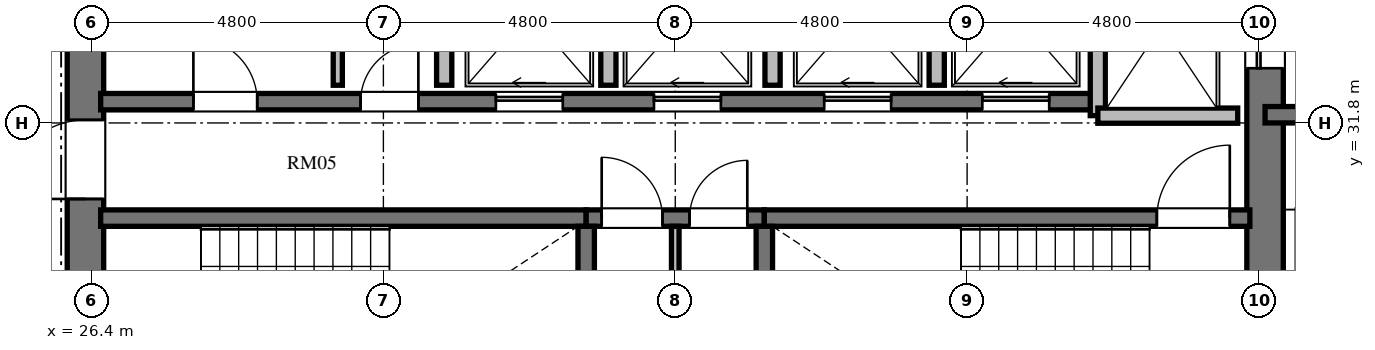
"""IFC4 building model, lengths in metres.
Left out: names, types, materials, properties, quantities, classifications, styles, units other than length and angle.
Written with IfcOpenShell. Run it as: python <this file> out.ifc"""

import sys

from ifc_helpers import new_model, si_unit, direction, frame, frame_2d, origin, place, context, subcontext, project, spatial, rectangle, extrude, element, fill, save


model = new_model("IFC4")
c1 = context("Model", 3, precision=1e-05, world=origin(), true_north=direction((0.0, 1.0)))
c2 = subcontext(c1, "Body", "Model", "MODEL_VIEW")
j1 = project(units=[si_unit("LENGTHUNIT", "METRE"), si_unit("PLANEANGLEUNIT", "RADIAN")], contexts=[c1])
p1 = place(None, origin())
s1 = spatial("IfcSite", under=j1, at=p1, CompositionType="ELEMENT")
p2 = place(p1, origin())
s2 = spatial("IfcBuilding", under=s1, at=p2, CompositionType="ELEMENT")
p3 = place(p2, frame((0.0, 0.0, 138.288)))
s3 = spatial("IfcBuildingStorey", under=s2, at=p3, CompositionType="ELEMENT", Elevation=138.288)
p4 = place(p3, frame((26.3, 20.95, 0.0), z_axis=(0.0, 0.0, 1.0), x_axis=(0.0, 1.0, 0.0)))
e1 = element("IfcWall", 1, at=p4, inside=s3, PredefinedType="SHEAR", context=c2, shape_type="SweptSolid", body=[
    extrude(rectangle(XDim=14.1, YDim=0.6, at=frame_2d((7.05, 0.0))), origin(), (0.0, 0.0, 1.0), 3.648),
])
p5 = place(p4, frame((6.5, 0.0, 0.0)))
e2 = element("IfcOpeningElement", 2, at=p5, cuts=e1, PredefinedType="OPENING", context=c2, shape_type="SweptSolid", body=[
    extrude(rectangle(XDim=1.2, YDim=2.15, at=frame_2d((0.6, 1.075))), frame((0.0, 0.31, 0.0), z_axis=(0.0, -1.0, 0.0), x_axis=(1.0, 0.0, 0.0)), (0.0, 0.0, 1.0), 0.62),
])
p6 = place(p4, frame((9.6, 0.0, 0.0)))
e3 = element("IfcOpeningElement", 3, at=p6, cuts=e1, PredefinedType="OPENING", context=c2, shape_type="SweptSolid", body=[
    extrude(rectangle(XDim=1.3, YDim=2.2, at=frame_2d((0.65, 1.1))), frame((0.0, 0.31, 0.0), z_axis=(0.0, -1.0, 0.0), x_axis=(1.0, 0.0, 0.0)), (0.0, 0.0, 1.0), 0.62),
])
p7 = place(p4, frame((3.26, 0.0, 0.0)))
e4 = element("IfcOpeningElement", 4, at=p7, cuts=e1, PredefinedType="OPENING", context=c2, shape_type="SweptSolid", body=[
    extrude(rectangle(XDim=1.3, YDim=2.2, at=frame_2d((0.65, 1.1))), frame((0.0, 0.31, 0.0), z_axis=(0.0, -1.0, 0.0), x_axis=(1.0, 0.0, 0.0)), (0.0, 0.0, 1.0), 0.62),
])
p8 = place(p3, frame((45.7, 20.95, 0.0), z_axis=(0.0, 0.0, 1.0), x_axis=(0.0, 1.0, 0.0)))
e5 = element("IfcWall", 5, at=p8, inside=s3, PredefinedType="SHEAR", context=c2, shape_type="SweptSolid", body=[
    extrude(rectangle(XDim=14.1, YDim=0.6, at=frame_2d((7.05, 0.0))), origin(), (0.0, 0.0, 1.0), 3.648),
])
p9 = place(p8, frame((11.75, 0.0, 0.0)))
e6 = element("IfcOpeningElement", 6, at=p9, cuts=e5, PredefinedType="OPENING", context=c2, shape_type="SweptSolid", body=[
    extrude(rectangle(XDim=1.4, YDim=2.3, at=frame_2d((0.7, 1.15))), frame((0.0, 0.31, 0.0), z_axis=(0.0, -1.0, 0.0), x_axis=(1.0, 0.0, 0.0)), (0.0, 0.0, 1.0), 0.62),
])
p10 = place(p8, frame((0.95, 0.0, 0.0)))
e7 = element("IfcOpeningElement", 7, at=p10, cuts=e5, PredefinedType="OPENING", context=c2, shape_type="SweptSolid", body=[
    extrude(rectangle(XDim=1.4, YDim=2.3, at=frame_2d((0.7, 1.15))), frame((0.0, 0.31, 0.0), z_axis=(0.0, -1.0, 0.0), x_axis=(1.0, 0.0, 0.0)), (0.0, 0.0, 1.0), 0.62),
])
p11 = place(p3, frame((26.55, 30.235, 0.0), z_axis=(0.0, 0.0, 1.0), x_axis=(1.0, 0.0, 0.0)))
e8 = element("IfcWall", 8, at=p11, inside=s3, PredefinedType="SHEAR", context=c2, shape_type="SweptSolid", body=[
    extrude(rectangle(XDim=7.985, YDim=0.27, at=frame_2d((3.992, 0.0))), origin(), (0.0, 0.0, 1.0), 3.648),
])
p12 = place(p3, frame((34.535, 30.235, 0.0), z_axis=(0.0, 0.0, 1.0), x_axis=(1.0, 0.0, 0.0)))
e9 = element("IfcWall", 9, at=p12, inside=s3, PredefinedType="SHEAR", context=c2, shape_type="SweptSolid", body=[
    extrude(rectangle(XDim=2.93, YDim=0.27, at=frame_2d((1.465, 0.0))), origin(), (0.0, 0.0, 1.0), 3.648),
])
p13 = place(p12, frame((0.255, 0.0, 0.0)))
e10 = element("IfcOpeningElement", 10, at=p13, cuts=e9, PredefinedType="OPENING", context=c2, shape_type="SweptSolid", body=[
    extrude(rectangle(XDim=1.0, YDim=2.1, at=frame_2d((0.5, 1.05))), frame((0.0, 0.145, 0.0), z_axis=(0.0, -1.0, 0.0), x_axis=(1.0, 0.0, 0.0)), (0.0, 0.0, 1.0), 0.29),
])
p14 = place(p12, frame((1.7, 0.0, 0.0)))
e11 = element("IfcOpeningElement", 11, at=p14, cuts=e9, PredefinedType="OPENING", context=c2, shape_type="SweptSolid", body=[
    extrude(rectangle(XDim=0.95, YDim=2.1, at=frame_2d((0.475, 1.05))), frame((0.0, 0.145, 0.0), z_axis=(0.0, -1.0, 0.0), x_axis=(1.0, 0.0, 0.0)), (0.0, 0.0, 1.0), 0.29),
])
p15 = place(p3, frame((37.465, 30.235, 0.0), z_axis=(0.0, 0.0, 1.0), x_axis=(1.0, 0.0, 0.0)))
e12 = element("IfcWall", 12, at=p15, inside=s3, PredefinedType="SHEAR", context=c2, shape_type="SweptSolid", body=[
    extrude(rectangle(XDim=7.985, YDim=0.27, at=frame_2d((3.992, 0.0))), origin(), (0.0, 0.0, 1.0), 3.648),
])
p16 = place(p15, frame((6.455, 0.0, 0.0)))
e13 = element("IfcOpeningElement", 13, at=p16, cuts=e12, PredefinedType="OPENING", context=c2, shape_type="SweptSolid", body=[
    extrude(rectangle(XDim=1.2, YDim=2.15, at=frame_2d((0.6, 1.075))), frame((0.0, 0.145, 0.0), z_axis=(0.0, -1.0, 0.0), x_axis=(1.0, 0.0, 0.0)), (0.0, 0.0, 1.0), 0.29),
])
for number, where, z_axis, x_axis in (
    (14, (34.535, 26.02, 0.0), (0.0, 0.0, 1.0), (0.0, 1.0, 0.0)),
    (15, (37.465, 26.02, 0.0), (0.0, 0.0, 1.0), (0.0, 1.0, 0.0)),
):
    element("IfcWall", number, at=place(p3, frame(where, z_axis=z_axis, x_axis=x_axis)), inside=s3, PredefinedType="SHEAR", context=c2, shape_type="SweptSolid", body=[
        extrude(rectangle(XDim=4.08, YDim=0.27, at=frame_2d((2.04, 0.0))), origin(), (0.0, 0.0, 1.0), 3.648),
    ])
p17 = place(p3, frame((36.0, 26.02, 0.0), z_axis=(0.0, 0.0, 1.0), x_axis=(0.0, 1.0, 0.0)))
e16 = element("IfcWall", 16, at=p17, inside=s3, PredefinedType="PARTITIONING", context=c2, shape_type="SweptSolid", body=[
    extrude(rectangle(XDim=4.08, YDim=0.125, at=frame_2d((2.04, 0.0))), origin(), (0.0, 0.0, 1.0), 3.428),
])
p18 = place(p3, frame((26.55, 32.15, 0.0), z_axis=(0.0, 0.0, 1.0), x_axis=(1.0, 0.0, 0.0)))
e17 = element("IfcWall", 17, at=p18, inside=s3, PredefinedType="SHEAR", context=c2, shape_type="SweptSolid", body=[
    extrude(rectangle(XDim=16.4, YDim=0.27, at=frame_2d((8.2, 0.0))), origin(), (0.0, 0.0, 1.0), 3.648),
])
p19 = place(p18, frame((1.525, 0.0, 0.0)))
e18 = element("IfcOpeningElement", 18, at=p19, cuts=e17, PredefinedType="OPENING", context=c2, shape_type="SweptSolid", body=[
    extrude(rectangle(XDim=1.05, YDim=2.15, at=frame_2d((0.525, 1.075))), frame((0.0, 0.145, 0.0), z_axis=(0.0, -1.0, 0.0), x_axis=(1.0, 0.0, 0.0)), (0.0, 0.0, 1.0), 0.29),
])
p20 = place(p18, frame((4.275, 0.0, 0.0)))
e19 = element("IfcOpeningElement", 19, at=p20, cuts=e17, PredefinedType="OPENING", context=c2, shape_type="SweptSolid", body=[
    extrude(rectangle(XDim=0.95, YDim=2.1, at=frame_2d((0.475, 1.05))), frame((0.0, 0.145, 0.0), z_axis=(0.0, -1.0, 0.0), x_axis=(1.0, 0.0, 0.0)), (0.0, 0.0, 1.0), 0.29),
])
p21 = place(p18, frame((6.5, 0.0, 0.0)))
e20 = element("IfcOpeningElement", 20, at=p21, cuts=e17, PredefinedType="OPENING", context=c2, shape_type="SweptSolid", body=[
    extrude(rectangle(XDim=1.1, YDim=2.2, at=frame_2d((0.55, 1.1))), frame((0.0, 0.145, 0.0), z_axis=(0.0, -1.0, 0.0), x_axis=(1.0, 0.0, 0.0)), (0.0, 0.0, 1.0), 0.29),
])
p22 = place(p18, frame((9.1, 0.0, 0.0)))
e21 = element("IfcOpeningElement", 21, at=p22, cuts=e17, PredefinedType="OPENING", context=c2, shape_type="SweptSolid", body=[
    extrude(rectangle(XDim=1.1, YDim=2.2, at=frame_2d((0.55, 1.1))), frame((0.0, 0.145, 0.0), z_axis=(0.0, -1.0, 0.0), x_axis=(1.0, 0.0, 0.0)), (0.0, 0.0, 1.0), 0.29),
])
p23 = place(p18, frame((11.9, 0.0, 0.0)))
e22 = element("IfcOpeningElement", 22, at=p23, cuts=e17, PredefinedType="OPENING", context=c2, shape_type="SweptSolid", body=[
    extrude(rectangle(XDim=1.1, YDim=2.2, at=frame_2d((0.55, 1.1))), frame((0.0, 0.145, 0.0), z_axis=(0.0, -1.0, 0.0), x_axis=(1.0, 0.0, 0.0)), (0.0, 0.0, 1.0), 0.29),
])
p24 = place(p18, frame((14.5, 0.0, 0.0)))
e23 = element("IfcOpeningElement", 23, at=p24, cuts=e17, PredefinedType="OPENING", context=c2, shape_type="SweptSolid", body=[
    extrude(rectangle(XDim=1.1, YDim=2.2, at=frame_2d((0.55, 1.1))), frame((0.0, 0.145, 0.0), z_axis=(0.0, -1.0, 0.0), x_axis=(1.0, 0.0, 0.0)), (0.0, 0.0, 1.0), 0.29),
])
p25 = place(p3, frame((42.95, 31.92, 0.0), z_axis=(0.0, 0.0, 1.0), x_axis=(0.0, 1.0, 0.0)))
e24 = element("IfcWall", 24, at=p25, inside=s3, PredefinedType="SOLIDWALL", context=c2, shape_type="SweptSolid", body=[
    extrude(rectangle(XDim=3.18, YDim=0.25, at=frame_2d((1.59, 0.0))), origin(), (0.0, 0.0, 1.0), 3.428),
])
p26 = place(p3, frame((42.95, 31.92, 0.0), z_axis=(0.0, 0.0, 1.0), x_axis=(1.0, 0.0, 0.0)))
e25 = element("IfcWall", 25, at=p26, inside=s3, PredefinedType="SOLIDWALL", context=c2, shape_type="SweptSolid", body=[
    extrude(rectangle(XDim=2.3, YDim=0.25, at=frame_2d((1.15, 0.0))), origin(), (0.0, 0.0, 1.0), 3.428),
])
for number, where, z_axis, x_axis in (
    (26, (32.2, 32.42, 0.0), (0.0, 0.0, 1.0), (0.0, 1.0, 0.0)),
    (27, (34.9, 32.42, 0.0), (0.0, 0.0, 1.0), (0.0, 1.0, 0.0)),
    (28, (37.6, 32.42, 0.0), (0.0, 0.0, 1.0), (0.0, 1.0, 0.0)),
    (29, (40.3, 32.42, 0.0), (0.0, 0.0, 1.0), (0.0, 1.0, 0.0)),
):
    element("IfcWall", number, at=place(p3, frame(where, z_axis=z_axis, x_axis=x_axis)), inside=s3, PredefinedType="SOLIDWALL", context=c2, shape_type="SweptSolid", body=[
        extrude(rectangle(XDim=2.68, YDim=0.25, at=frame_2d((1.34, 0.0))), origin(), (0.0, 0.0, 1.0), 3.428),
    ])
p27 = place(p3, frame((30.45, 32.42, 0.0), z_axis=(0.0, 0.0, 1.0), x_axis=(0.0, 1.0, 0.0)))
e30 = element("IfcWall", 30, at=p27, inside=s3, PredefinedType="PARTITIONING", context=c2, shape_type="SweptSolid", body=[
    extrude(rectangle(XDim=2.68, YDim=0.15, at=frame_2d((1.34, 0.0))), origin(), (0.0, 0.0, 1.0), 3.428),
])
p28 = place(p3, frame((45.7, 31.935, 0.0), z_axis=(0.0, 0.0, 1.0), x_axis=(1.0, 0.0, 0.0)))
e31 = element("IfcWall", 31, at=p28, inside=s3, PredefinedType="SHEAR", context=c2, shape_type="SweptSolid", body=[
    extrude(rectangle(XDim=4.715, YDim=0.27, at=frame_2d((2.357, 0.0))), origin(), (0.0, 0.0, 1.0), 3.648),
])
p29 = place(p16, origin())
e32 = element("IfcDoor", 32, at=p29, inside=s3, OperationType="SINGLE_SWING_RIGHT", PredefinedType="DOOR", context=c2, shape_type="SweptSolid", body=[
    extrude(rectangle(XDim=1.2, YDim=2.15, at=frame_2d((0.6, 1.075))), frame((0.0, 0.025, 0.0), z_axis=(0.0, -1.0, 0.0), x_axis=(1.0, 0.0, 0.0)), (0.0, 0.0, 1.0), 0.05),
])
fill(e13, e32)
p30 = place(p13, origin())
e33 = element("IfcDoor", 33, at=p30, inside=s3, OperationType="SINGLE_SWING_LEFT", PredefinedType="DOOR", context=c2, shape_type="SweptSolid", body=[
    extrude(rectangle(XDim=1.0, YDim=2.1, at=frame_2d((0.5, 1.05))), frame((0.0, 0.025, 0.0), z_axis=(0.0, -1.0, 0.0), x_axis=(1.0, 0.0, 0.0)), (0.0, 0.0, 1.0), 0.05),
])
fill(e10, e33)
p31 = place(p14, origin())
e34 = element("IfcDoor", 34, at=p31, inside=s3, OperationType="SINGLE_SWING_RIGHT", PredefinedType="DOOR", context=c2, shape_type="SweptSolid", body=[
    extrude(rectangle(XDim=0.95, YDim=2.1, at=frame_2d((0.475, 1.05))), frame((0.0, 0.025, 0.0), z_axis=(0.0, -1.0, 0.0), x_axis=(1.0, 0.0, 0.0)), (0.0, 0.0, 1.0), 0.05),
])
fill(e11, e34)
p32 = place(p6, origin())
e35 = element("IfcDoor", 35, at=p32, inside=s3, OperationType="SINGLE_SWING_LEFT", PredefinedType="DOOR", context=c2, shape_type="SweptSolid", body=[
    extrude(rectangle(XDim=1.3, YDim=2.2, at=frame_2d((0.65, 1.1))), frame((0.0, 0.025, 0.0), z_axis=(0.0, -1.0, 0.0), x_axis=(1.0, 0.0, 0.0)), (0.0, 0.0, 1.0), 0.05),
])
fill(e3, e35)
p33 = place(p19, origin())
e36 = element("IfcDoor", 36, at=p33, inside=s3, OperationType="SINGLE_SWING_LEFT", PredefinedType="DOOR", context=c2, shape_type="SweptSolid", body=[
    extrude(rectangle(XDim=1.05, YDim=2.15, at=frame_2d((0.525, 1.075))), frame((0.0, 0.025, 0.0), z_axis=(0.0, -1.0, 0.0), x_axis=(1.0, 0.0, 0.0)), (0.0, 0.0, 1.0), 0.05),
])
fill(e18, e36)
p34 = place(p20, origin())
e37 = element("IfcDoor", 37, at=p34, inside=s3, OperationType="SINGLE_SWING_RIGHT", PredefinedType="DOOR", context=c2, shape_type="SweptSolid", body=[
    extrude(rectangle(XDim=0.95, YDim=2.1, at=frame_2d((0.475, 1.05))), frame((0.0, 0.025, 0.0), z_axis=(0.0, -1.0, 0.0), x_axis=(1.0, 0.0, 0.0)), (0.0, 0.0, 1.0), 0.05),
])
fill(e19, e37)
p35 = place(p21, origin())
e38 = element("IfcDoor", 38, at=p35, inside=s3, OperationType="SLIDING_TO_LEFT", PredefinedType="DOOR", context=c2, shape_type="SweptSolid", body=[
    extrude(rectangle(XDim=1.1, YDim=2.2, at=frame_2d((0.55, 1.1))), frame((0.0, 0.025, 0.0), z_axis=(0.0, -1.0, 0.0), x_axis=(1.0, 0.0, 0.0)), (0.0, 0.0, 1.0), 0.05),
])
fill(e20, e38)
p36 = place(p22, origin())
e39 = element("IfcDoor", 39, at=p36, inside=s3, OperationType="SLIDING_TO_LEFT", PredefinedType="DOOR", context=c2, shape_type="SweptSolid", body=[
    extrude(rectangle(XDim=1.1, YDim=2.2, at=frame_2d((0.55, 1.1))), frame((0.0, 0.025, 0.0), z_axis=(0.0, -1.0, 0.0), x_axis=(1.0, 0.0, 0.0)), (0.0, 0.0, 1.0), 0.05),
])
fill(e21, e39)
p37 = place(p23, origin())
e40 = element("IfcDoor", 40, at=p37, inside=s3, OperationType="SLIDING_TO_LEFT", PredefinedType="DOOR", context=c2, shape_type="SweptSolid", body=[
    extrude(rectangle(XDim=1.1, YDim=2.2, at=frame_2d((0.55, 1.1))), frame((0.0, 0.025, 0.0), z_axis=(0.0, -1.0, 0.0), x_axis=(1.0, 0.0, 0.0)), (0.0, 0.0, 1.0), 0.05),
])
fill(e22, e40)
p38 = place(p24, origin())
e41 = element("IfcDoor", 41, at=p38, inside=s3, OperationType="SLIDING_TO_LEFT", PredefinedType="DOOR", context=c2, shape_type="SweptSolid", body=[
    extrude(rectangle(XDim=1.1, YDim=2.2, at=frame_2d((0.55, 1.1))), frame((0.0, 0.025, 0.0), z_axis=(0.0, -1.0, 0.0), x_axis=(1.0, 0.0, 0.0)), (0.0, 0.0, 1.0), 0.05),
])
fill(e23, e41)
p39 = place(p9, origin())
e42 = element("IfcDoor", 42, at=p39, inside=s3, OperationType="SLIDING_TO_LEFT", PredefinedType="DOOR", context=c2, shape_type="SweptSolid", body=[
    extrude(rectangle(XDim=1.4, YDim=2.3, at=frame_2d((0.7, 1.15))), frame((0.0, 0.025, 0.0), z_axis=(0.0, -1.0, 0.0), x_axis=(1.0, 0.0, 0.0)), (0.0, 0.0, 1.0), 0.05),
])
fill(e6, e42)
save(model, sys.argv[1])
